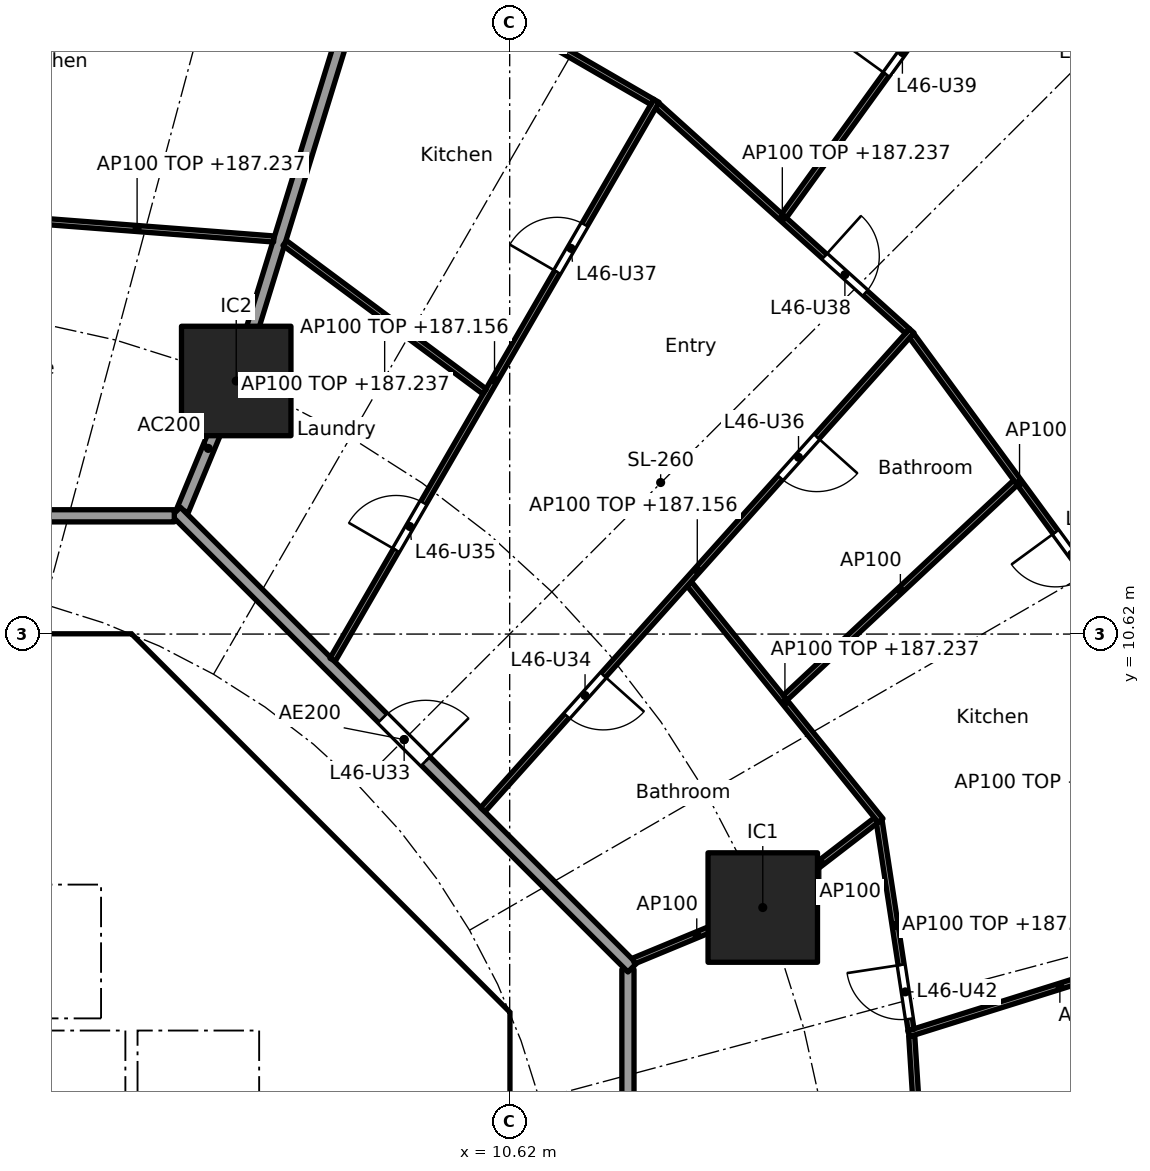
"""IFC4 building model, lengths in metres.
Left out: names, types, materials, properties, quantities, classifications, styles, units other than length and angle.
Written with IfcOpenShell. Run it as: python <this file> out.ifc"""

import sys

from ifc_helpers import new_model, si_unit, direction, frame, frame_2d, origin, origin_2d, place, context, subcontext, project, spatial, polyline, rectangle, outline, extrude, element, fill, save


model = new_model("IFC4")
c1 = context("Model", 3, precision=1e-05, world=origin(), true_north=direction((0.0, 1.0)))
c2 = subcontext(c1, "Body", "Model", "MODEL_VIEW")
j1 = project(units=[si_unit("LENGTHUNIT", "METRE"), si_unit("PLANEANGLEUNIT", "RADIAN")], contexts=[c1])
p1 = place(None, origin())
s1 = spatial("IfcSite", under=j1, at=p1, CompositionType="ELEMENT")
p2 = place(p1, origin())
s2 = spatial("IfcBuilding", under=s1, at=p2, CompositionType="ELEMENT")
p3 = place(p2, frame((0.0, 0.0, 184.4)))
s3 = spatial("IfcBuildingStorey", under=s2, at=p3, CompositionType="ELEMENT", Elevation=184.4)
for number, where, z_axis, x_axis in (
    (1, (14.782, 6.123, 0.0), (0.0, 0.0, 1.0), (1.0, 0.0, 0.0)),
    (2, (6.123, 14.782, 0.0), (0.0, 0.0, 1.0), (1.0, 0.0, 0.0)),
):
    element("IfcColumn", number, at=place(p3, frame(where, z_axis=z_axis, x_axis=x_axis)), inside=s3, PredefinedType="COLUMN", context=c2, shape_type="SweptSolid", body=[
        extrude(rectangle(XDim=1.8, YDim=1.8, at=origin_2d()), origin(), (0.0, 0.0, 1.0), 3.7),
    ])
p4 = place(p3, frame((9.988, 4.613, 0.0), z_axis=(0.0, 0.0, 1.0), x_axis=(-0.707106781187, 0.707106781187, 0.0)))
e3 = element("IfcWall", 3, at=p4, inside=s3, PredefinedType="SHEAR", context=c2, shape_type="SweptSolid", body=[
    extrude(rectangle(XDim=7.602, YDim=0.6, at=frame_2d((3.801, 0.0))), origin(), (0.0, 0.0, 1.0), 3.44),
])
p5 = place(p4, frame((3.201, 0.0, 0.0)))
e4 = element("IfcOpeningElement", 4, at=p5, cuts=e3, PredefinedType="OPENING", context=c2, shape_type="SweptSolid", body=[
    extrude(rectangle(XDim=1.2, YDim=2.1, at=frame_2d((0.6, 1.05))), frame((0.0, 0.31, 0.0), z_axis=(0.0, -1.0, 0.0), x_axis=(1.0, 0.0, 0.0)), (0.0, 0.0, 1.0), 0.62),
])
p6 = place(p3, frame((4.0, 4.3, 0.0), z_axis=(0.0, 0.0, 1.0), x_axis=(0.0, 1.0, 0.0)))
e5 = element("IfcWall", 5, at=p6, inside=s3, PredefinedType="SOLIDWALL", context=c2, shape_type="SweptSolid", body=[
    extrude(rectangle(XDim=2.2, YDim=0.2, at=frame_2d((1.1, 0.0))), origin(), (0.0, 0.0, 1.0), 3.44),
])
p7 = place(p6, frame((0.55, 0.0, 0.0)))
e6 = element("IfcOpeningElement", 6, at=p7, cuts=e5, PredefinedType="OPENING", context=c2, shape_type="SweptSolid", body=[
    extrude(rectangle(XDim=1.1, YDim=2.1, at=frame_2d((0.55, 1.05))), frame((0.0, 0.11, 0.0), z_axis=(0.0, -1.0, 0.0), x_axis=(1.0, 0.0, 0.0)), (0.0, 0.0, 1.0), 0.22),
])
p8 = place(p3, frame((6.7, 4.0, 0.0), z_axis=(0.0, 0.0, 1.0), x_axis=(1.0, 0.0, 0.0)))
e7 = element("IfcWall", 7, at=p8, inside=s3, PredefinedType="SOLIDWALL", context=c2, shape_type="SweptSolid", body=[
    extrude(rectangle(XDim=3.325, YDim=0.2, at=frame_2d((1.662, 0.0))), origin(), (0.0, 0.0, 1.0), 3.44),
])
p9 = place(p8, frame((1.25, 0.0, 0.0)))
e8 = element("IfcOpeningElement", 8, at=p9, cuts=e7, PredefinedType="OPENING", context=c2, shape_type="SweptSolid", body=[
    extrude(rectangle(XDim=1.1, YDim=2.1, at=frame_2d((0.55, 1.05))), frame((0.0, 0.11, 0.0), z_axis=(0.0, -1.0, 0.0), x_axis=(1.0, 0.0, 0.0)), (0.0, 0.0, 1.0), 0.22),
])
p10 = place(p3, frame((4.0, 7.025, 0.0), z_axis=(0.0, 0.0, 1.0), x_axis=(0.0, 1.0, 0.0)))
e9 = element("IfcWall", 9, at=p10, inside=s3, PredefinedType="SOLIDWALL", context=c2, shape_type="SweptSolid", body=[
    extrude(rectangle(XDim=3.0, YDim=0.2, at=frame_2d((1.5, 0.0))), origin(), (0.0, 0.0, 1.0), 3.44),
])
p11 = place(p10, frame((0.925, 0.0, 0.0)))
e10 = element("IfcOpeningElement", 10, at=p11, cuts=e9, PredefinedType="OPENING", context=c2, shape_type="SweptSolid", body=[
    extrude(rectangle(XDim=1.1, YDim=2.1, at=frame_2d((0.55, 1.05))), frame((0.0, 0.11, 0.0), z_axis=(0.0, -1.0, 0.0), x_axis=(1.0, 0.0, 0.0)), (0.0, 0.0, 1.0), 0.22),
])
p12 = place(p3, origin())
e11 = element("IfcWall", 11, at=p12, inside=s3, PredefinedType="SHEAR", context=c2, shape_type="SweptSolid", body=[
    extrude(outline(polyline([(-4.152, 10.025), (-4.401, 9.776), (-4.825, 10.2), (-4.401, 10.625), (4.401, 10.625), (4.825, 10.2), (4.401, 9.776), (4.152, 10.025), (-4.152, 10.025)])), origin(), (0.0, 0.0, 1.0), 3.44),
])
p13 = place(p3, origin())
e12 = element("IfcWall", 12, at=p13, inside=s3, PredefinedType="SHEAR", context=c2, shape_type="SweptSolid", body=[
    extrude(outline(polyline([(9.776, -4.401), (10.025, -4.152), (10.025, -3.801), (10.025, 4.152), (9.776, 4.401), (10.2, 4.825), (10.625, 4.401), (10.625, -4.401), (10.2, -4.825), (9.776, -4.401)])), origin(), (0.0, 0.0, 1.0), 3.44),
])
p14 = place(p3, origin())
e13 = element("IfcWall", 13, at=p14, inside=s3, PredefinedType="SOLIDWALL", context=c2, shape_type="SweptSolid", body=[
    extrude(outline(polyline([(-6.7, 4.3), (6.7, 4.3), (6.7, 2.1), (6.5, 2.1), (6.5, 4.1), (4.5, 4.1), (4.5, 2.1), (4.3, 2.1), (4.3, 4.1), (2.3, 4.1), (2.3, 2.1), (2.1, 2.1), (2.1, 4.1), (0.1, 4.1), (0.1, 2.1), (-0.1, 2.1), (-0.1, 4.1), (-2.1, 4.1), (-2.1, 2.1), (-2.3, 2.1), (-2.3, 4.1), (-6.5, 4.1), (-6.5, 2.1), (-6.7, 2.1), (-6.7, 4.3)])), origin(), (0.0, 0.0, 1.0), 3.44),
])
p15 = place(p3, origin())
e14 = element("IfcWall", 14, at=p15, inside=s3, PredefinedType="SOLIDWALL", context=c2, shape_type="SweptSolid", body=[
    extrude(outline(polyline([(4.1, 6.5), (-4.1, 6.5), (-4.1, 7.025), (4.1, 7.025), (4.1, 6.5)])), origin(), (0.0, 0.0, 1.0), 3.44),
])
p16 = place(p3, origin())
e15 = element("IfcWall", 15, at=p16, inside=s3, PredefinedType="SOLIDWALL", context=c2, shape_type="SweptSolid", body=[
    extrude(outline(polyline([(7.025, -3.9), (6.7, -3.9), (6.7, 3.9), (7.025, 3.9), (7.025, -3.9)])), origin(), (0.0, 0.0, 1.0), 3.44),
])
p17 = place(p3, frame((5.243, 12.657, 0.0), z_axis=(0.0, 0.0, 1.0), x_axis=(0.382747093259, 0.923853160736, 0.0)))
e16 = element("IfcWall", 16, at=p17, inside=s3, PredefinedType="PARTITIONING", context=c2, shape_type="SweptSolid", body=[
    extrude(rectangle(XDim=2.2, YDim=0.2, at=frame_2d((1.1, 0.0))), origin(), (0.0, 0.0, 1.0), 3.44),
])
p18 = place(p3, frame((6.138, 14.83, 0.0), z_axis=(0.0, 0.0, 1.0), x_axis=(0.294818517221, 0.955553264818, 0.0)))
e17 = element("IfcWall", 17, at=p18, inside=s3, PredefinedType="PARTITIONING", context=c2, shape_type="SweptSolid", body=[
    extrude(rectangle(XDim=12.619, YDim=0.2, at=frame_2d((6.31, 0.0))), origin(), (0.0, 0.0, 1.0), 2.837),
])
p19 = place(p3, frame((12.565, -5.104, 0.0), z_axis=(0.0, 0.0, 1.0), x_axis=(0.0, 1.0, 0.0)))
e18 = element("IfcWall", 18, at=p19, inside=s3, PredefinedType="PARTITIONING", context=c2, shape_type="SweptSolid", body=[
    extrude(rectangle(XDim=10.209, YDim=0.2, at=frame_2d((5.104, 0.0))), origin(), (0.0, 0.0, 1.0), 3.44),
])
p20 = place(p3, frame((12.635, 5.134, 0.0), z_axis=(0.0, 0.0, 1.0), x_axis=(-0.707106781187, 0.707106781187, 0.0)))
e19 = element("IfcWall", 19, at=p20, inside=s3, PredefinedType="PARTITIONING", context=c2, shape_type="SweptSolid", body=[
    extrude(rectangle(XDim=10.609, YDim=0.2, at=frame_2d((5.305, 0.0))), origin(), (0.0, 0.0, 1.0), 3.44),
])
p21 = place(p20, frame((4.804, 0.0, 0.0)))
e20 = element("IfcOpeningElement", 20, at=p21, cuts=e19, PredefinedType="OPENING", context=c2, shape_type="SweptSolid", body=[
    extrude(rectangle(XDim=1.0, YDim=2.1, at=frame_2d((0.5, 1.05))), frame((0.0, 0.11, 0.0), z_axis=(0.0, -1.0, 0.0), x_axis=(1.0, 0.0, 0.0)), (0.0, 0.0, 1.0), 0.22),
])
p22 = place(p3, frame((5.104, 12.565, 0.0), z_axis=(0.0, 0.0, 1.0), x_axis=(-1.0, 0.0, 0.0)))
e21 = element("IfcWall", 21, at=p22, inside=s3, PredefinedType="PARTITIONING", context=c2, shape_type="SweptSolid", body=[
    extrude(rectangle(XDim=10.409, YDim=0.2, at=frame_2d((5.205, 0.0))), origin(), (0.0, 0.0, 1.0), 3.44),
])
p23 = place(p22, frame((6.339, 0.0, 0.0)))
e22 = element("IfcOpeningElement", 22, at=p23, cuts=e21, PredefinedType="OPENING", context=c2, shape_type="SweptSolid", body=[
    extrude(rectangle(XDim=1.0, YDim=2.1, at=frame_2d((0.5, 1.05))), frame((0.0, 0.11, 0.0), z_axis=(0.0, -1.0, 0.0), x_axis=(1.0, 0.0, 0.0)), (0.0, 0.0, 1.0), 0.22),
])
p24 = place(p3, frame((17.485, 0.05, 0.0), z_axis=(0.0, 0.0, 1.0), x_axis=(-0.063679314345, 0.99797041285, 0.0)))
e23 = element("IfcWall", 23, at=p24, inside=s3, PredefinedType="PARTITIONING", context=c2, shape_type="SweptSolid", body=[
    extrude(rectangle(XDim=3.972, YDim=0.1, at=frame_2d((1.986, 0.0))), origin(), (0.0, 0.0, 1.0), 2.837),
])
p25 = place(p3, frame((17.181, 4.049, 0.0), z_axis=(0.0, 0.0, 1.0), x_axis=(0.954246359918, 0.299021545351, 0.0)))
e24 = element("IfcWall", 24, at=p25, inside=s3, PredefinedType="PARTITIONING", context=c2, shape_type="SweptSolid", body=[
    extrude(rectangle(XDim=5.213, YDim=0.1, at=frame_2d((2.606, 0.0))), origin(), (0.0, 0.0, 1.0), 3.44),
])
p26 = place(p3, frame((17.221, 4.113, 0.0), z_axis=(0.0, 0.0, 1.0), x_axis=(-0.151078880423, 0.988521710379, 0.0)))
e25 = element("IfcWall", 25, at=p26, inside=s3, PredefinedType="PARTITIONING", context=c2, shape_type="SweptSolid", body=[
    extrude(rectangle(XDim=3.469, YDim=0.1, at=frame_2d((1.735, 0.0))), origin(), (0.0, 0.0, 1.0), 2.837),
])
p27 = place(p26, frame((0.18, 0.0, 0.0)))
e26 = element("IfcOpeningElement", 26, at=p27, cuts=e25, PredefinedType="OPENING", context=c2, shape_type="SweptSolid", body=[
    extrude(rectangle(XDim=0.9, YDim=2.1, at=frame_2d((0.45, 1.05))), frame((0.0, 0.06, 0.0), z_axis=(0.0, -1.0, 0.0), x_axis=(1.0, 0.0, 0.0)), (0.0, 0.0, 1.0), 0.12),
])
p28 = place(p3, frame((12.657, 5.243, 0.0), z_axis=(0.0, 0.0, 1.0), x_axis=(0.923826362943, 0.382811769845, 0.0)))
e27 = element("IfcWall", 27, at=p28, inside=s3, PredefinedType="PARTITIONING", context=c2, shape_type="SweptSolid", body=[
    extrude(rectangle(XDim=2.25, YDim=0.1, at=frame_2d((1.125, 0.0))), origin(), (0.0, 0.0, 1.0), 3.44),
])
p29 = place(p3, frame((14.822, 6.154, 0.0), z_axis=(0.0, 0.0, 1.0), x_axis=(0.792226528082, 0.610227111987, 0.0)))
e28 = element("IfcWall", 28, at=p29, inside=s3, PredefinedType="PARTITIONING", context=c2, shape_type="SweptSolid", body=[
    extrude(rectangle(XDim=2.307, YDim=0.1, at=frame_2d((1.154, 0.0))), origin(), (0.0, 0.0, 1.0), 3.44),
])
p30 = place(p3, frame((16.721, 7.553, 0.0), z_axis=(0.0, 0.0, 1.0), x_axis=(-0.628753513808, 0.777604667472, 0.0)))
e29 = element("IfcWall", 29, at=p30, inside=s3, PredefinedType="PARTITIONING", context=c2, shape_type="SweptSolid", body=[
    extrude(rectangle(XDim=5.007, YDim=0.1, at=frame_2d((2.504, 0.0))), origin(), (0.0, 0.0, 1.0), 2.837),
])
p31 = place(p3, frame((20.781, 10.681, 0.0), z_axis=(0.0, 0.0, 1.0), x_axis=(-0.591117075283, 0.806585769345, 0.0)))
e30 = element("IfcWall", 30, at=p31, inside=s3, PredefinedType="PARTITIONING", context=c2, shape_type="SweptSolid", body=[
    extrude(rectangle(XDim=6.01, YDim=0.1, at=frame_2d((3.005, 0.0))), origin(), (0.0, 0.0, 1.0), 2.837),
])
p32 = place(p31, frame((1.103, 0.0, 0.0)))
e31 = element("IfcOpeningElement", 31, at=p32, cuts=e30, PredefinedType="OPENING", context=c2, shape_type="SweptSolid", body=[
    extrude(rectangle(XDim=0.9, YDim=2.1, at=frame_2d((0.45, 1.05))), frame((0.0, 0.06, 0.0), z_axis=(0.0, -1.0, 0.0), x_axis=(1.0, 0.0, 0.0)), (0.0, 0.0, 1.0), 0.12),
])
p33 = place(p3, frame((15.152, 9.573, 0.0), z_axis=(0.0, 0.0, 1.0), x_axis=(0.730723083214, 0.682673989294, 0.0)))
e32 = element("IfcWall", 32, at=p33, inside=s3, PredefinedType="PARTITIONING", context=c2, shape_type="SweptSolid", body=[
    extrude(rectangle(XDim=5.183, YDim=0.1, at=frame_2d((2.591, 0.0))), origin(), (0.0, 0.0, 1.0), 3.44),
])
p34 = place(p3, frame((10.178, 7.732, 0.0), z_axis=(0.0, 0.0, 1.0), x_axis=(0.667280084362, 0.744806880348, 0.0)))
e33 = element("IfcWall", 33, at=p34, inside=s3, PredefinedType="PARTITIONING", context=c2, shape_type="SweptSolid", body=[
    extrude(rectangle(XDim=10.572, YDim=0.1, at=frame_2d((5.286, 0.0))), origin(), (0.0, 0.0, 1.0), 2.756),
])
p35 = place(p34, frame((2.07, 0.0, 0.0)))
e34 = element("IfcOpeningElement", 34, at=p35, cuts=e33, PredefinedType="OPENING", context=c2, shape_type="SweptSolid", body=[
    extrude(rectangle(XDim=0.9, YDim=2.1, at=frame_2d((0.45, 1.05))), frame((0.0, 0.06, 0.0), z_axis=(0.0, -1.0, 0.0), x_axis=(1.0, 0.0, 0.0)), (0.0, 0.0, 1.0), 0.12),
])
p36 = place(p34, frame((7.331, 0.0, 0.0)))
e35 = element("IfcOpeningElement", 35, at=p36, cuts=e33, PredefinedType="OPENING", context=c2, shape_type="SweptSolid", body=[
    extrude(rectangle(XDim=0.9, YDim=2.1, at=frame_2d((0.45, 1.05))), frame((0.0, 0.06, 0.0), z_axis=(0.0, -1.0, 0.0), x_axis=(1.0, 0.0, 0.0)), (0.0, 0.0, 1.0), 0.12),
])
p37 = place(p3, frame((17.162, 15.603, 0.0), z_axis=(0.0, 0.0, 1.0), x_axis=(-0.742790086539, 0.66952437397, 0.0)))
e36 = element("IfcWall", 36, at=p37, inside=s3, PredefinedType="PARTITIONING", context=c2, shape_type="SweptSolid", body=[
    extrude(rectangle(XDim=5.542, YDim=0.1, at=frame_2d((2.771, 0.0))), origin(), (0.0, 0.0, 1.0), 2.837),
])
p38 = place(p37, frame((0.935, 0.0, 0.0)))
e37 = element("IfcOpeningElement", 37, at=p38, cuts=e36, PredefinedType="OPENING", context=c2, shape_type="SweptSolid", body=[
    extrude(rectangle(XDim=0.9, YDim=2.1, at=frame_2d((0.45, 1.05))), frame((0.0, 0.06, 0.0), z_axis=(0.0, -1.0, 0.0), x_axis=(1.0, 0.0, 0.0)), (0.0, 0.0, 1.0), 0.12),
])
p39 = place(p3, frame((15.133, 17.498, 0.0), z_axis=(0.0, 0.0, 1.0), x_axis=(0.586223556927, 0.810149332718, 0.0)))
e38 = element("IfcWall", 38, at=p39, inside=s3, PredefinedType="PARTITIONING", context=c2, shape_type="SweptSolid", body=[
    extrude(rectangle(XDim=6.638, YDim=0.1, at=frame_2d((3.319, 0.0))), origin(), (0.0, 0.0, 1.0), 2.905),
])
p40 = place(p39, frame((2.869, 0.0, 0.0)))
e39 = element("IfcOpeningElement", 39, at=p40, cuts=e38, PredefinedType="OPENING", context=c2, shape_type="SweptSolid", body=[
    extrude(rectangle(XDim=0.9, YDim=2.1, at=frame_2d((0.45, 1.05))), frame((0.0, 0.06, 0.0), z_axis=(0.0, -1.0, 0.0), x_axis=(1.0, 0.0, 0.0)), (0.0, 0.0, 1.0), 0.12),
])
p41 = place(p3, frame((7.708, 10.198, 0.0), z_axis=(0.0, 0.0, 1.0), x_axis=(0.501288100085, 0.865280440501, 0.0)))
e40 = element("IfcWall", 40, at=p41, inside=s3, PredefinedType="PARTITIONING", context=c2, shape_type="SweptSolid", body=[
    extrude(rectangle(XDim=10.623, YDim=0.1, at=frame_2d((5.312, 0.0))), origin(), (0.0, 0.0, 1.0), 2.756),
])
p42 = place(p41, frame((2.082, 0.0, 0.0)))
e41 = element("IfcOpeningElement", 41, at=p42, cuts=e40, PredefinedType="OPENING", context=c2, shape_type="SweptSolid", body=[
    extrude(rectangle(XDim=0.9, YDim=2.1, at=frame_2d((0.45, 1.05))), frame((0.0, 0.06, 0.0), z_axis=(0.0, -1.0, 0.0), x_axis=(1.0, 0.0, 0.0)), (0.0, 0.0, 1.0), 0.12),
])
p43 = place(p41, frame((7.369, 0.0, 0.0)))
e42 = element("IfcOpeningElement", 42, at=p43, cuts=e40, PredefinedType="OPENING", context=c2, shape_type="SweptSolid", body=[
    extrude(rectangle(XDim=0.9, YDim=2.1, at=frame_2d((0.45, 1.05))), frame((0.0, 0.06, 0.0), z_axis=(0.0, -1.0, 0.0), x_axis=(1.0, 0.0, 0.0)), (0.0, 0.0, 1.0), 0.12),
])
p44 = place(p3, frame((10.207, 14.61, 0.0), z_axis=(0.0, 0.0, 1.0), x_axis=(-0.802769141821, 0.596289950394, 0.0)))
e43 = element("IfcWall", 43, at=p44, inside=s3, PredefinedType="PARTITIONING", context=c2, shape_type="SweptSolid", body=[
    extrude(rectangle(XDim=4.092, YDim=0.1, at=frame_2d((2.046, 0.0))), origin(), (0.0, 0.0, 1.0), 2.837),
])
p45 = place(p3, frame((12.965, 19.371, 0.0), z_axis=(0.0, 0.0, 1.0), x_axis=(-0.865286427811, 0.501277765163, 0.0)))
e44 = element("IfcWall", 44, at=p45, inside=s3, PredefinedType="PARTITIONING", context=c2, shape_type="SweptSolid", body=[
    extrude(rectangle(XDim=5.22, YDim=0.1, at=frame_2d((2.61, 0.0))), origin(), (0.0, 0.0, 1.0), 2.837),
])
p46 = place(p3, frame((6.741, 17.117, 0.0), z_axis=(0.0, 0.0, 1.0), x_axis=(-0.997078320723, 0.076386008825, 0.0)))
e45 = element("IfcWall", 45, at=p46, inside=s3, PredefinedType="PARTITIONING", context=c2, shape_type="SweptSolid", body=[
    extrude(rectangle(XDim=4.51, YDim=0.1, at=frame_2d((2.255, 0.0))), origin(), (0.0, 0.0, 1.0), 2.837),
])
p47 = place(p7, origin())
e46 = element("IfcDoor", 46, at=p47, inside=s3, OperationType="DOUBLE_DOOR_SLIDING", PredefinedType="DOOR", context=c2, shape_type="SweptSolid", body=[
    extrude(rectangle(XDim=1.1, YDim=2.1, at=frame_2d((0.55, 1.05))), frame((0.0, 0.025, 0.0), z_axis=(0.0, -1.0, 0.0), x_axis=(1.0, 0.0, 0.0)), (0.0, 0.0, 1.0), 0.05),
])
fill(e6, e46)
p48 = place(p9, frame((1.1, 0.0, 0.0), x_axis=(-1.0, 0.0, 0.0)))
e47 = element("IfcDoor", 47, at=p48, inside=s3, OperationType="SINGLE_SWING_RIGHT", PredefinedType="DOOR", context=c2, shape_type="SweptSolid", body=[
    extrude(rectangle(XDim=1.1, YDim=2.1, at=frame_2d((0.55, 1.05))), frame((0.0, 0.025, 0.0), z_axis=(0.0, -1.0, 0.0), x_axis=(1.0, 0.0, 0.0)), (0.0, 0.0, 1.0), 0.05),
])
fill(e8, e47)
p49 = place(p11, origin())
e48 = element("IfcDoor", 48, at=p49, inside=s3, OperationType="SINGLE_SWING_LEFT", PredefinedType="DOOR", context=c2, shape_type="SweptSolid", body=[
    extrude(rectangle(XDim=1.1, YDim=2.1, at=frame_2d((0.55, 1.05))), frame((0.0, 0.025, 0.0), z_axis=(0.0, -1.0, 0.0), x_axis=(1.0, 0.0, 0.0)), (0.0, 0.0, 1.0), 0.05),
])
fill(e10, e48)
p50 = place(p5, origin())
e49 = element("IfcDoor", 49, at=p50, inside=s3, OperationType="SINGLE_SWING_RIGHT", PredefinedType="DOOR", context=c2, shape_type="SweptSolid", body=[
    extrude(rectangle(XDim=1.2, YDim=2.1, at=frame_2d((0.6, 1.05))), frame((0.0, 0.025, 0.0), z_axis=(0.0, -1.0, 0.0), x_axis=(1.0, 0.0, 0.0)), (0.0, 0.0, 1.0), 0.05),
])
fill(e4, e49)
p51 = place(p21, frame((1.0, 0.0, 0.0), x_axis=(-1.0, 0.0, 0.0)))
e50 = element("IfcDoor", 50, at=p51, inside=s3, OperationType="SINGLE_SWING_RIGHT", PredefinedType="DOOR", context=c2, shape_type="SweptSolid", body=[
    extrude(rectangle(XDim=1.0, YDim=2.1, at=frame_2d((0.5, 1.05))), frame((0.0, 0.025, 0.0), z_axis=(0.0, -1.0, 0.0), x_axis=(1.0, 0.0, 0.0)), (0.0, 0.0, 1.0), 0.05),
])
fill(e20, e50)
p52 = place(p35, frame((0.9, 0.0, 0.0), x_axis=(-1.0, 0.0, 0.0)))
e51 = element("IfcDoor", 51, at=p52, inside=s3, OperationType="SINGLE_SWING_LEFT", PredefinedType="DOOR", context=c2, shape_type="SweptSolid", body=[
    extrude(rectangle(XDim=0.9, YDim=2.1, at=frame_2d((0.45, 1.05))), frame((0.0, 0.025, 0.0), z_axis=(0.0, -1.0, 0.0), x_axis=(1.0, 0.0, 0.0)), (0.0, 0.0, 1.0), 0.05),
])
fill(e34, e51)
p53 = place(p42, origin())
e52 = element("IfcDoor", 52, at=p53, inside=s3, OperationType="SINGLE_SWING_LEFT", PredefinedType="DOOR", context=c2, shape_type="SweptSolid", body=[
    extrude(rectangle(XDim=0.9, YDim=2.1, at=frame_2d((0.45, 1.05))), frame((0.0, 0.025, 0.0), z_axis=(0.0, -1.0, 0.0), x_axis=(1.0, 0.0, 0.0)), (0.0, 0.0, 1.0), 0.05),
])
fill(e41, e52)
p54 = place(p36, frame((0.9, 0.0, 0.0), x_axis=(-1.0, 0.0, 0.0)))
e53 = element("IfcDoor", 53, at=p54, inside=s3, OperationType="SINGLE_SWING_LEFT", PredefinedType="DOOR", context=c2, shape_type="SweptSolid", body=[
    extrude(rectangle(XDim=0.9, YDim=2.1, at=frame_2d((0.45, 1.05))), frame((0.0, 0.025, 0.0), z_axis=(0.0, -1.0, 0.0), x_axis=(1.0, 0.0, 0.0)), (0.0, 0.0, 1.0), 0.05),
])
fill(e35, e53)
p55 = place(p43, origin())
e54 = element("IfcDoor", 54, at=p55, inside=s3, OperationType="SINGLE_SWING_LEFT", PredefinedType="DOOR", context=c2, shape_type="SweptSolid", body=[
    extrude(rectangle(XDim=0.9, YDim=2.1, at=frame_2d((0.45, 1.05))), frame((0.0, 0.025, 0.0), z_axis=(0.0, -1.0, 0.0), x_axis=(1.0, 0.0, 0.0)), (0.0, 0.0, 1.0), 0.05),
])
fill(e42, e54)
p56 = place(p38, frame((0.9, 0.0, 0.0), x_axis=(-1.0, 0.0, 0.0)))
e55 = element("IfcDoor", 55, at=p56, inside=s3, OperationType="SINGLE_SWING_LEFT", PredefinedType="DOOR", context=c2, shape_type="SweptSolid", body=[
    extrude(rectangle(XDim=0.9, YDim=2.1, at=frame_2d((0.45, 1.05))), frame((0.0, 0.025, 0.0), z_axis=(0.0, -1.0, 0.0), x_axis=(1.0, 0.0, 0.0)), (0.0, 0.0, 1.0), 0.05),
])
fill(e37, e55)
p57 = place(p40, origin())
e56 = element("IfcDoor", 56, at=p57, inside=s3, OperationType="SINGLE_SWING_LEFT", PredefinedType="DOOR", context=c2, shape_type="SweptSolid", body=[
    extrude(rectangle(XDim=0.9, YDim=2.1, at=frame_2d((0.45, 1.05))), frame((0.0, 0.025, 0.0), z_axis=(0.0, -1.0, 0.0), x_axis=(1.0, 0.0, 0.0)), (0.0, 0.0, 1.0), 0.05),
])
fill(e39, e56)
p58 = place(p32, origin())
e57 = element("IfcDoor", 57, at=p58, inside=s3, OperationType="SINGLE_SWING_RIGHT", PredefinedType="DOOR", context=c2, shape_type="SweptSolid", body=[
    extrude(rectangle(XDim=0.9, YDim=2.1, at=frame_2d((0.45, 1.05))), frame((0.0, 0.025, 0.0), z_axis=(0.0, -1.0, 0.0), x_axis=(1.0, 0.0, 0.0)), (0.0, 0.0, 1.0), 0.05),
])
fill(e31, e57)
p59 = place(p27, origin())
e58 = element("IfcDoor", 58, at=p59, inside=s3, OperationType="SINGLE_SWING_RIGHT", PredefinedType="DOOR", context=c2, shape_type="SweptSolid", body=[
    extrude(rectangle(XDim=0.9, YDim=2.1, at=frame_2d((0.45, 1.05))), frame((0.0, 0.025, 0.0), z_axis=(0.0, -1.0, 0.0), x_axis=(1.0, 0.0, 0.0)), (0.0, 0.0, 1.0), 0.05),
])
fill(e26, e58)
save(model, sys.argv[1])
